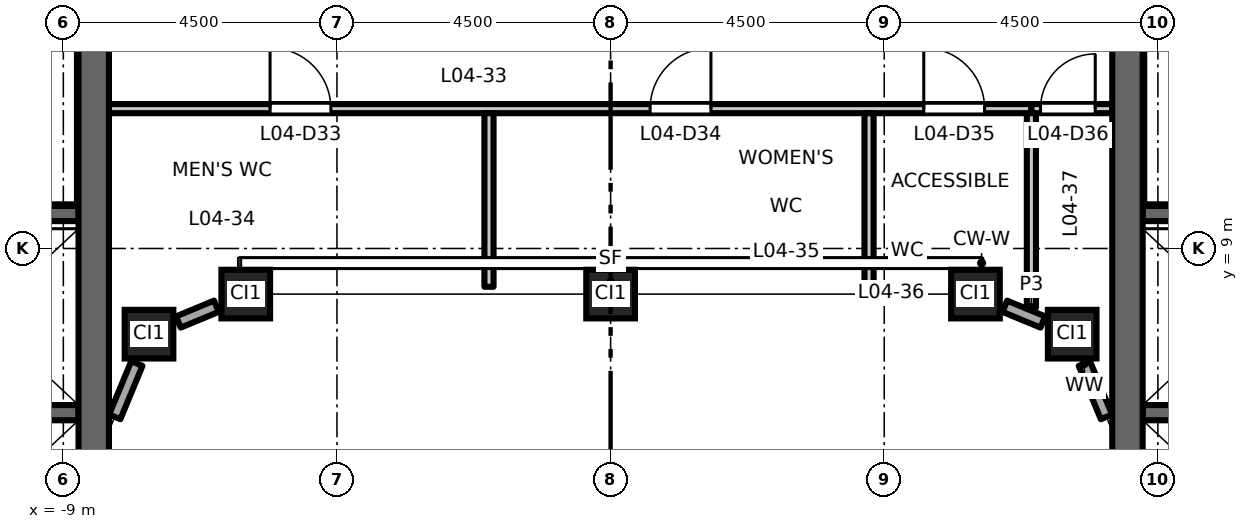
"""IFC4 building model, lengths in metres.
Left out: names, types, materials, properties, quantities, classifications, styles, units other than length and angle.
Written with IfcOpenShell. Run it as: python <this file> out.ifc"""

import sys

from ifc_helpers import new_model, si_unit, direction, frame, frame_2d, origin, origin_2d, place, context, subcontext, project, spatial, rectangle, hollow_rectangle, extrude, element, fill, save


model = new_model("IFC4")
c1 = context("Model", 3, precision=1e-05, world=origin(), true_north=direction((0.0, 1.0)))
c2 = subcontext(c1, "Body", "Model", "MODEL_VIEW")
j1 = project(units=[si_unit("LENGTHUNIT", "METRE"), si_unit("PLANEANGLEUNIT", "RADIAN")], contexts=[c1])
p1 = place(None, origin())
s1 = spatial("IfcSite", under=j1, at=p1, CompositionType="ELEMENT")
p2 = place(p1, origin())
s2 = spatial("IfcBuilding", under=s1, at=p2, CompositionType="ELEMENT")
p3 = place(p2, frame((0.0, 0.0, 22.2)))
s3 = spatial("IfcBuildingStorey", under=s2, at=p3, CompositionType="ELEMENT", Elevation=22.2)
for number, where, z_axis, x_axis in (
    (1, (-7.591, 7.591, 0.0), (0.0, 0.0, 1.0), (1.0, 0.0, 0.0)),
    (2, (-6.0, 8.25, 0.0), (0.0, 0.0, 1.0), (1.0, 0.0, 0.0)),
    (3, (0.0, 8.25, 0.0), (0.0, 0.0, 1.0), (1.0, 0.0, 0.0)),
    (4, (6.0, 8.25, 0.0), (0.0, 0.0, 1.0), (1.0, 0.0, 0.0)),
    (5, (7.591, 7.591, 0.0), (0.0, 0.0, 1.0), (1.0, 0.0, 0.0)),
):
    element("IfcColumn", number, at=place(p3, frame(where, z_axis=z_axis, x_axis=x_axis)), inside=s3, PredefinedType="COLUMN", context=c2, shape_type="SweptSolid", body=[
        extrude(hollow_rectangle(XDim=0.8, YDim=0.8, WallThickness=0.05, at=origin_2d()), origin(), (0.0, 0.0, 1.0), 4.5),
    ])
p4 = place(p3, frame((-8.75, 6.3, 0.0), z_axis=(0.0, 0.0, 1.0), x_axis=(-1.0, 0.0, 0.0)))
e6 = element("IfcWall", 6, at=p4, inside=s3, PredefinedType="SHEAR", context=c2, shape_type="SweptSolid", body=[
    extrude(rectangle(XDim=3.1, YDim=0.25, at=frame_2d((1.55, 0.0))), origin(), (0.0, 0.0, 1.0), 4.35),
])
p5 = place(p3, frame((-8.75, 9.575, 0.0), z_axis=(0.0, 0.0, 1.0), x_axis=(-1.0, 0.0, 0.0)))
e7 = element("IfcWall", 7, at=p5, inside=s3, PredefinedType="SHEAR", context=c2, shape_type="SweptSolid", body=[
    extrude(rectangle(XDim=8.0, YDim=0.25, at=frame_2d((4.0, 0.0))), origin(), (0.0, 0.0, 1.0), 4.35),
])
p6 = place(p5, frame((6.65, 0.0, 0.0)))
e8 = element("IfcOpeningElement", 8, at=p6, cuts=e7, PredefinedType="OPENING", context=c2, shape_type="SweptSolid", body=[
    extrude(rectangle(XDim=1.1, YDim=2.1, at=frame_2d((0.55, 1.05))), frame((0.0, 0.135, 0.0), z_axis=(0.0, -1.0, 0.0), x_axis=(1.0, 0.0, 0.0)), (0.0, 0.0, 1.0), 0.27),
])
p7 = place(p3, frame((-8.5, -13.0, 0.0), z_axis=(0.0, 0.0, 1.0), x_axis=(0.0, 1.0, 0.0)))
e9 = element("IfcWall", 9, at=p7, inside=s3, PredefinedType="SHEAR", context=c2, shape_type="SweptSolid", body=[
    extrude(rectangle(XDim=26.0, YDim=0.5, at=frame_2d((13.0, 0.0))), origin(), (0.0, 0.0, 1.0), 4.35),
])
p8 = place(p3, frame((8.75, 6.3, 0.0), z_axis=(0.0, 0.0, 1.0), x_axis=(1.0, 0.0, 0.0)))
e10 = element("IfcWall", 10, at=p8, inside=s3, PredefinedType="SHEAR", context=c2, shape_type="SweptSolid", body=[
    extrude(rectangle(XDim=3.1, YDim=0.25, at=frame_2d((1.55, 0.0))), origin(), (0.0, 0.0, 1.0), 4.35),
])
p9 = place(p3, frame((8.75, 9.575, 0.0), z_axis=(0.0, 0.0, 1.0), x_axis=(1.0, 0.0, 0.0)))
e11 = element("IfcWall", 11, at=p9, inside=s3, PredefinedType="SHEAR", context=c2, shape_type="SweptSolid", body=[
    extrude(rectangle(XDim=8.0, YDim=0.25, at=frame_2d((4.0, 0.0))), origin(), (0.0, 0.0, 1.0), 4.35),
])
p10 = place(p9, frame((6.65, 0.0, 0.0)))
e12 = element("IfcOpeningElement", 12, at=p10, cuts=e11, PredefinedType="OPENING", context=c2, shape_type="SweptSolid", body=[
    extrude(rectangle(XDim=1.1, YDim=2.1, at=frame_2d((0.55, 1.05))), frame((0.0, 0.135, 0.0), z_axis=(0.0, -1.0, 0.0), x_axis=(1.0, 0.0, 0.0)), (0.0, 0.0, 1.0), 0.27),
])
p11 = place(p3, frame((8.5, -13.0, 0.0), z_axis=(0.0, 0.0, 1.0), x_axis=(0.0, 1.0, 0.0)))
e13 = element("IfcWall", 13, at=p11, inside=s3, PredefinedType="SHEAR", context=c2, shape_type="SweptSolid", body=[
    extrude(rectangle(XDim=26.0, YDim=0.5, at=frame_2d((13.0, 0.0))), origin(), (0.0, 0.0, 1.0), 4.35),
])
p12 = place(p3, frame((8.154, 6.231, 0.0), z_axis=(0.0, 0.0, 1.0), x_axis=(-0.382624318388, 0.923904016107, 0.0)))
e14 = element("IfcWall", 14, at=p12, inside=s3, PredefinedType="STANDARD", context=c2, shape_type="SweptSolid", body=[
    extrude(rectangle(XDim=0.949, YDim=0.2, at=frame_2d((0.475, 0.0))), origin(), (0.0, 0.0, 1.0), 3.73),
])
for number, where, z_axis, x_axis in (
    (15, (7.108, 7.791, 0.0), (0.0, 0.0, 1.0), (-0.924, 0.383, 0.0)),
    (16, (-6.483, 8.05, 0.0), (0.0, 0.0, 1.0), (-0.924, -0.383, 0.0)),
):
    element("IfcWall", number, at=place(p3, frame(where, z_axis=z_axis, x_axis=x_axis)), inside=s3, PredefinedType="STANDARD", context=c2, shape_type="SweptSolid", body=[
        extrude(rectangle(XDim=0.677, YDim=0.2, at=frame_2d((0.338, 0.0))), origin(), (0.0, 0.0, 1.0), 3.73),
    ])
p13 = place(p3, frame((-7.791, 7.108, 0.0), z_axis=(0.0, 0.0, 1.0), x_axis=(-0.382624318388, -0.923904016107, 0.0)))
e17 = element("IfcWall", 17, at=p13, inside=s3, PredefinedType="STANDARD", context=c2, shape_type="SweptSolid", body=[
    extrude(rectangle(XDim=0.949, YDim=0.2, at=frame_2d((0.475, 0.0))), origin(), (0.0, 0.0, 1.0), 3.73),
])
p14 = place(p3, frame((-8.25, 11.3, 0.0), z_axis=(0.0, 0.0, 1.0), x_axis=(1.0, 0.0, 0.0)))
e18 = element("IfcWall", 18, at=p14, inside=s3, PredefinedType="PARTITIONING", context=c2, shape_type="SweptSolid", body=[
    extrude(rectangle(XDim=15.17, YDim=0.15, at=frame_2d((7.585, 0.0))), origin(), (0.0, 0.0, 1.0), 4.35),
])
p15 = place(p14, frame((2.65, 0.0, 0.0)))
e19 = element("IfcOpeningElement", 19, at=p15, cuts=e18, PredefinedType="OPENING", context=c2, shape_type="SweptSolid", body=[
    extrude(rectangle(XDim=1.0, YDim=2.1, at=frame_2d((0.5, 1.05))), frame((0.0, 0.085, 0.0), z_axis=(0.0, -1.0, 0.0), x_axis=(1.0, 0.0, 0.0)), (0.0, 0.0, 1.0), 0.17),
])
p16 = place(p14, frame((8.9, 0.0, 0.0)))
e20 = element("IfcOpeningElement", 20, at=p16, cuts=e18, PredefinedType="OPENING", context=c2, shape_type="SweptSolid", body=[
    extrude(rectangle(XDim=1.0, YDim=2.1, at=frame_2d((0.5, 1.05))), frame((0.0, 0.085, 0.0), z_axis=(0.0, -1.0, 0.0), x_axis=(1.0, 0.0, 0.0)), (0.0, 0.0, 1.0), 0.17),
])
p17 = place(p14, frame((13.4, 0.0, 0.0)))
e21 = element("IfcOpeningElement", 21, at=p17, cuts=e18, PredefinedType="OPENING", context=c2, shape_type="SweptSolid", body=[
    extrude(rectangle(XDim=1.0, YDim=2.1, at=frame_2d((0.5, 1.05))), frame((0.0, 0.085, 0.0), z_axis=(0.0, -1.0, 0.0), x_axis=(1.0, 0.0, 0.0)), (0.0, 0.0, 1.0), 0.17),
])
p18 = place(p3, frame((6.92, 11.3, 0.0), z_axis=(0.0, 0.0, 1.0), x_axis=(1.0, 0.0, 0.0)))
e22 = element("IfcWall", 22, at=p18, inside=s3, PredefinedType="PARTITIONING", context=c2, shape_type="SweptSolid", body=[
    extrude(rectangle(XDim=1.33, YDim=0.15, at=frame_2d((0.665, 0.0))), origin(), (0.0, 0.0, 1.0), 4.35),
])
p19 = place(p18, frame((0.15, 0.0, 0.0)))
e23 = element("IfcOpeningElement", 23, at=p19, cuts=e22, PredefinedType="OPENING", context=c2, shape_type="SweptSolid", body=[
    extrude(rectangle(XDim=0.9, YDim=2.1, at=frame_2d((0.45, 1.05))), frame((0.0, 0.085, 0.0), z_axis=(0.0, -1.0, 0.0), x_axis=(1.0, 0.0, 0.0)), (0.0, 0.0, 1.0), 0.17),
])
for number, where, z_axis, x_axis in (
    (24, (-2.0, 8.37, 0.0), (0.0, 0.0, 1.0), (0.0, 1.0, 0.0)),
    (25, (4.25, 8.37, 0.0), (0.0, 0.0, 1.0), (0.0, 1.0, 0.0)),
):
    element("IfcWall", number, at=place(p3, frame(where, z_axis=z_axis, x_axis=x_axis)), inside=s3, PredefinedType="PARTITIONING", context=c2, shape_type="SweptSolid", body=[
        extrude(rectangle(XDim=2.855, YDim=0.15, at=frame_2d((1.427, 0.0))), origin(), (0.0, 0.0, 1.0), 4.35),
    ])
p20 = place(p3, frame((6.92, 8.028, 0.0), z_axis=(0.0, 0.0, 1.0), x_axis=(0.0, 1.0, 0.0)))
e26 = element("IfcWall", 26, at=p20, inside=s3, PredefinedType="PARTITIONING", context=c2, shape_type="SweptSolid", body=[
    extrude(rectangle(XDim=3.197, YDim=0.15, at=frame_2d((1.599, 0.0))), origin(), (0.0, 0.0, 1.0), 4.35),
])
p21 = place(p15, origin())
e27 = element("IfcDoor", 27, at=p21, inside=s3, OperationType="SINGLE_SWING_LEFT", PredefinedType="DOOR", context=c2, shape_type="SweptSolid", body=[
    extrude(rectangle(XDim=1.0, YDim=2.1, at=frame_2d((0.5, 1.05))), frame((0.0, 0.025, 0.0), z_axis=(0.0, -1.0, 0.0), x_axis=(1.0, 0.0, 0.0)), (0.0, 0.0, 1.0), 0.05),
])
fill(e19, e27)
p22 = place(p16, origin())
e28 = element("IfcDoor", 28, at=p22, inside=s3, OperationType="SINGLE_SWING_RIGHT", PredefinedType="DOOR", context=c2, shape_type="SweptSolid", body=[
    extrude(rectangle(XDim=1.0, YDim=2.1, at=frame_2d((0.5, 1.05))), frame((0.0, 0.025, 0.0), z_axis=(0.0, -1.0, 0.0), x_axis=(1.0, 0.0, 0.0)), (0.0, 0.0, 1.0), 0.05),
])
fill(e20, e28)
p23 = place(p17, origin())
e29 = element("IfcDoor", 29, at=p23, inside=s3, OperationType="SINGLE_SWING_LEFT", PredefinedType="DOOR", context=c2, shape_type="SweptSolid", body=[
    extrude(rectangle(XDim=1.0, YDim=2.1, at=frame_2d((0.5, 1.05))), frame((0.0, 0.025, 0.0), z_axis=(0.0, -1.0, 0.0), x_axis=(1.0, 0.0, 0.0)), (0.0, 0.0, 1.0), 0.05),
])
fill(e21, e29)
p24 = place(p19, origin())
e30 = element("IfcDoor", 30, at=p24, inside=s3, OperationType="SINGLE_SWING_RIGHT", PredefinedType="DOOR", context=c2, shape_type="SweptSolid", body=[
    extrude(rectangle(XDim=0.9, YDim=2.1, at=frame_2d((0.45, 1.05))), frame((0.0, 0.025, 0.0), z_axis=(0.0, -1.0, 0.0), x_axis=(1.0, 0.0, 0.0)), (0.0, 0.0, 1.0), 0.05),
])
fill(e23, e30)
save(model, sys.argv[1])
